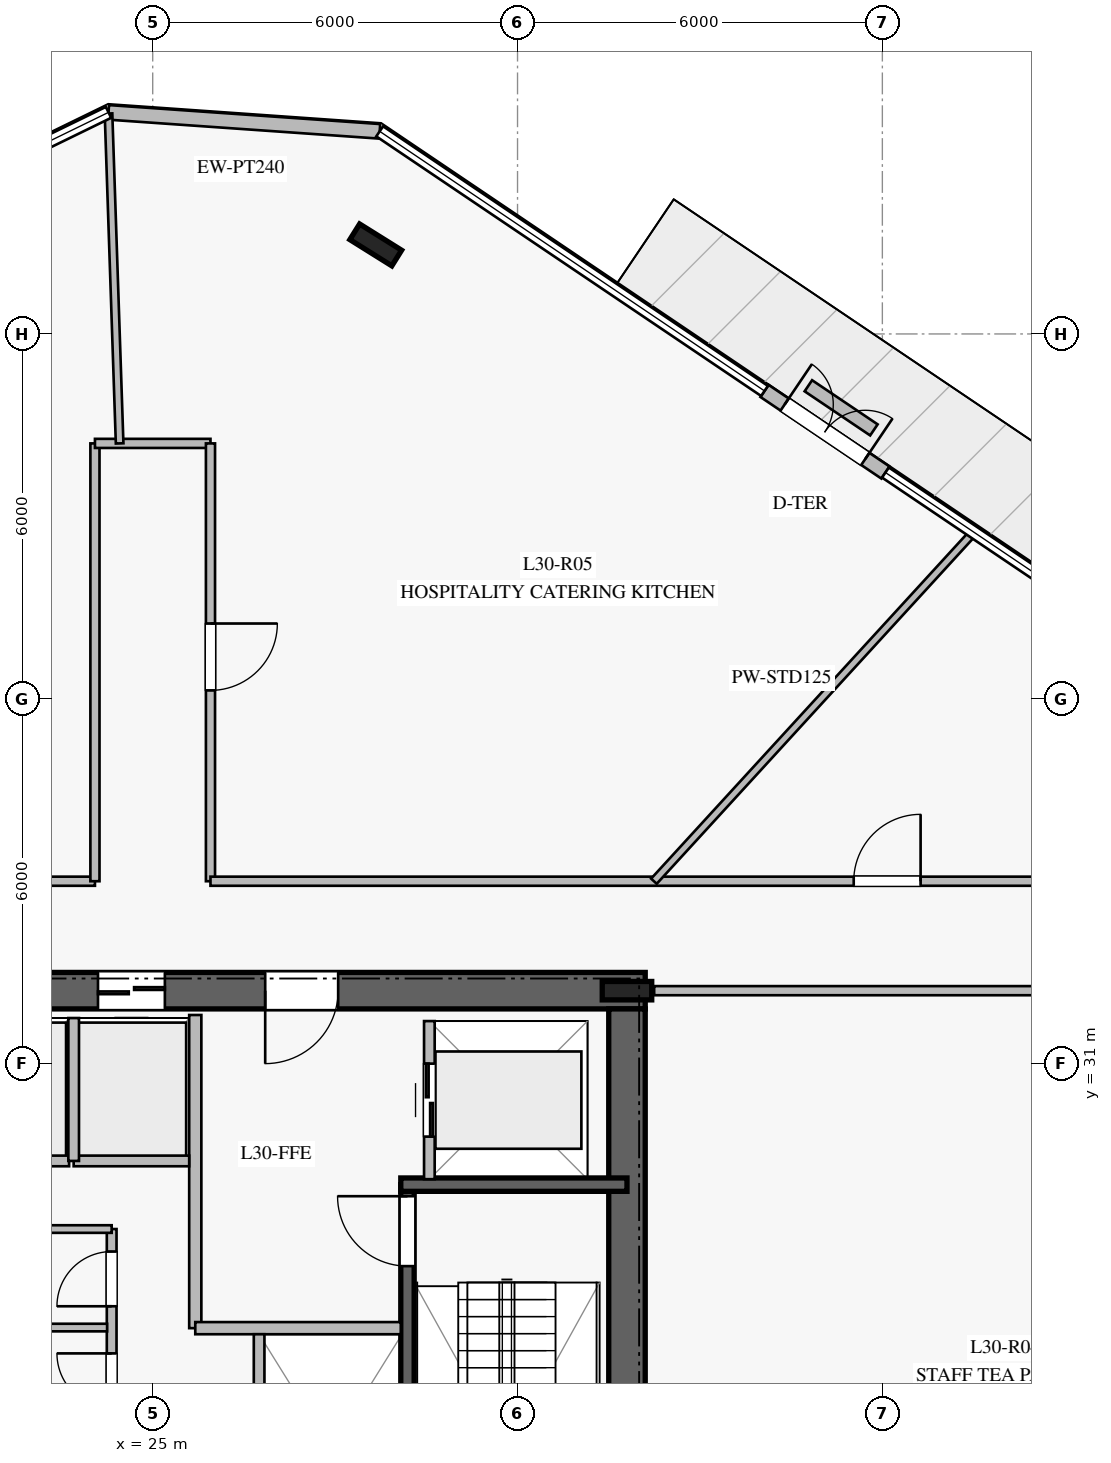
"""IFC4 building model, lengths in metres.
Left out: names, types, materials, properties, quantities, classifications, styles, units other than length and angle.
Written with IfcOpenShell. Run it as: python <this file> out.ifc"""

import sys

from ifc_helpers import new_model, si_unit, direction, frame, frame_2d, origin, origin_2d, place, context, subcontext, project, spatial, rectangle, i_section, extrude, element, fill, save


model = new_model("IFC4")
c1 = context("Model", 3, precision=1e-05, world=origin(), true_north=direction((0.0, 1.0)))
c2 = subcontext(c1, "Body", "Model", "MODEL_VIEW")
j1 = project(units=[si_unit("LENGTHUNIT", "METRE"), si_unit("PLANEANGLEUNIT", "RADIAN")], contexts=[c1])
p1 = place(None, origin())
s1 = spatial("IfcSite", under=j1, at=p1, CompositionType="ELEMENT")
p2 = place(p1, origin())
s2 = spatial("IfcBuilding", under=s1, at=p2, CompositionType="ELEMENT")
p3 = place(p2, frame((0.0, 0.0, 126.4)))
s3 = spatial("IfcBuildingStorey", under=s2, at=p3, CompositionType="ELEMENT", Elevation=126.4)
p4 = place(p3, frame((33.1, 32.2, 0.0), z_axis=(0.0, 0.0, 1.0), x_axis=(-1.0, 0.0, 0.0)))
e1 = element("IfcWall", 1, at=p4, inside=s3, PredefinedType="SHEAR", context=c2, shape_type="SweptSolid", body=[
    extrude(rectangle(XDim=16.2, YDim=0.6, at=frame_2d((8.1, 0.0))), origin(), (0.0, 0.0, 1.0), 3.76),
])
p5 = place(p4, frame((5.05, 0.0, 0.0)))
e2 = element("IfcOpeningElement", 2, at=p5, cuts=e1, PredefinedType="OPENING", context=c2, shape_type="SweptSolid", body=[
    extrude(rectangle(XDim=1.2, YDim=2.25, at=frame_2d((0.6, 1.125))), frame((0.0, 0.31, 0.0), z_axis=(0.0, -1.0, 0.0), x_axis=(1.0, 0.0, 0.0)), (0.0, 0.0, 1.0), 0.62),
])
p6 = place(p4, frame((11.85, 0.0, 0.0)))
e3 = element("IfcOpeningElement", 3, at=p6, cuts=e1, PredefinedType="OPENING", context=c2, shape_type="SweptSolid", body=[
    extrude(rectangle(XDim=1.1, YDim=2.2, at=frame_2d((0.55, 1.1))), frame((0.0, 0.31, 0.0), z_axis=(0.0, -1.0, 0.0), x_axis=(1.0, 0.0, 0.0)), (0.0, 0.0, 1.0), 0.62),
])
p7 = place(p4, frame((9.875, 0.0, 0.0)))
e4 = element("IfcOpeningElement", 4, at=p7, cuts=e1, PredefinedType="OPENING", context=c2, shape_type="SweptSolid", body=[
    extrude(rectangle(XDim=1.1, YDim=2.2, at=frame_2d((0.55, 1.1))), frame((0.0, 0.31, 0.0), z_axis=(0.0, -1.0, 0.0), x_axis=(1.0, 0.0, 0.0)), (0.0, 0.0, 1.0), 0.62),
])
p8 = place(p4, frame((7.9, 0.0, 0.0)))
e5 = element("IfcOpeningElement", 5, at=p8, cuts=e1, PredefinedType="OPENING", context=c2, shape_type="SweptSolid", body=[
    extrude(rectangle(XDim=1.1, YDim=2.2, at=frame_2d((0.55, 1.1))), frame((0.0, 0.31, 0.0), z_axis=(0.0, -1.0, 0.0), x_axis=(1.0, 0.0, 0.0)), (0.0, 0.0, 1.0), 0.62),
])
p9 = place(p3, frame((32.8, 18.1, 0.0), z_axis=(0.0, 0.0, 1.0), x_axis=(0.0, 1.0, 0.0)))
e6 = element("IfcWall", 6, at=p9, inside=s3, PredefinedType="SHEAR", context=c2, shape_type="SweptSolid", body=[
    extrude(rectangle(XDim=13.8, YDim=0.6, at=frame_2d((6.9, 0.0))), origin(), (0.0, 0.0, 1.0), 3.76),
])
p10 = place(p3, frame((32.8, 32.2, 0.0), z_axis=(0.0, 0.0, 1.0), x_axis=(1.0, 0.0, 0.0)))
e7 = element("IfcColumn", 7, at=p10, inside=s3, PredefinedType="COLUMN", context=c2, shape_type="SweptSolid", body=[
    extrude(i_section(OverallWidth=0.303, OverallDepth=0.814, WebThickness=0.021, FlangeThickness=0.04, at=origin_2d()), origin(), (0.0, 0.0, 1.0), 4.0),
])
p11 = place(p3, frame((29.19, 21.79, 0.0), z_axis=(0.0, 0.0, 1.0), x_axis=(0.0, 1.0, 0.0)))
e8 = element("IfcWall", 8, at=p11, inside=s3, PredefinedType="SOLIDWALL", context=c2, shape_type="SweptSolid", body=[
    extrude(rectangle(XDim=7.22, YDim=0.22, at=frame_2d((3.61, 0.0))), origin(), (0.0, 0.0, 1.0), 3.76),
])
p12 = place(p11, frame((5.88, 0.0, 0.0)))
e9 = element("IfcOpeningElement", 9, at=p12, cuts=e8, PredefinedType="OPENING", context=c2, shape_type="SweptSolid", body=[
    extrude(rectangle(XDim=1.15, YDim=2.2, at=frame_2d((0.575, 1.1))), frame((0.0, 0.12, 0.0), z_axis=(0.0, -1.0, 0.0), x_axis=(1.0, 0.0, 0.0)), (0.0, 0.0, 1.0), 0.24),
])
p13 = place(p3, frame((29.08, 29.01, 0.0), z_axis=(0.0, 0.0, 1.0), x_axis=(1.0, 0.0, 0.0)))
e10 = element("IfcWall", 10, at=p13, inside=s3, PredefinedType="SOLIDWALL", context=c2, shape_type="SweptSolid", body=[
    extrude(rectangle(XDim=3.72, YDim=0.22, at=frame_2d((1.86, 0.0))), origin(), (0.0, 0.0, 1.0), 3.76),
])
p14 = place(p3, frame((28.668, 44.464, 0.0), z_axis=(0.0, 0.0, 1.0), x_axis=(-0.848048096156, 0.529919264233, 0.0)))
e11 = element("IfcColumn", 11, at=p14, inside=s3, PredefinedType="COLUMN", context=c2, shape_type="SweptSolid", body=[
    extrude(i_section(OverallWidth=0.303, OverallDepth=0.814, WebThickness=0.021, FlangeThickness=0.04, at=origin_2d()), origin(), (0.0, 0.0, 1.0), 4.0),
])
p15 = place(p3, frame((37.051, 40.721, 0.0), z_axis=(0.0, 0.0, 1.0), x_axis=(-0.828953641959, 0.559317315558, 0.0)))
e12 = element("IfcWall", 12, at=p15, inside=s3, PredefinedType="STANDARD", context=c2, shape_type="SweptSolid", body=[
    extrude(rectangle(XDim=2.399, YDim=0.24, at=frame_2d((1.2, 0.0))), origin(), (0.0, 0.0, 1.0), 3.76),
])
p16 = place(p15, frame((0.4, 0.0, 0.0)))
e13 = element("IfcOpeningElement", 13, at=p16, cuts=e12, PredefinedType="OPENING", context=c2, shape_type="SweptSolid", body=[
    extrude(rectangle(XDim=1.6, YDim=2.25, at=frame_2d((0.8, 1.125))), frame((0.0, 0.13, 0.0), z_axis=(0.0, -1.0, 0.0), x_axis=(1.0, 0.0, 0.0)), (0.0, 0.0, 1.0), 0.26),
])
p17 = place(p3, frame((28.733, 46.332, 0.0), z_axis=(0.0, 0.0, 1.0), x_axis=(-0.997561857217, 0.069787828636, 0.0)))
e14 = element("IfcWall", 14, at=p17, inside=s3, PredefinedType="STANDARD", context=c2, shape_type="SweptSolid", body=[
    extrude(rectangle(XDim=4.471, YDim=0.24, at=frame_2d((2.235, 0.0))), origin(), (0.0, 0.0, 1.0), 3.76),
])
p18 = place(p3, frame((36.861, 41.422, 0.0), z_axis=(0.0, 0.0, 1.0), x_axis=(-0.829527502059, 0.558465865857, 0.0)))
e15 = element("IfcWall", 15, at=p18, inside=s3, PredefinedType="USERDEFINED", context=c2, shape_type="SweptSolid", body=[
    extrude(rectangle(XDim=1.3, YDim=0.22, at=frame_2d((0.65, 0.0))), origin(), (0.0, 0.0, 1.0), 0.4),
])
p19 = place(p3, frame((25.7, 26.65, 0.0), z_axis=(0.0, 0.0, 1.0), x_axis=(0.0, 1.0, 0.0)))
e16 = element("IfcWall", 16, at=p19, inside=s3, PredefinedType="PARTITIONING", context=c2, shape_type="SweptSolid", body=[
    extrude(rectangle(XDim=5.15, YDim=0.2, at=frame_2d((2.575, 0.0))), origin(), (0.0, 0.0, 1.0), 3.76),
])
p20 = place(p3, frame((25.7, 26.65, 0.0), z_axis=(0.0, 0.0, 1.0), x_axis=(1.0, 0.0, 0.0)))
e17 = element("IfcWall", 17, at=p20, inside=s3, PredefinedType="PARTITIONING", context=c2, shape_type="SweptSolid", body=[
    extrude(rectangle(XDim=3.38, YDim=0.2, at=frame_2d((1.69, 0.0))), origin(), (0.0, 0.0, 1.0), 3.76),
])
p21 = place(p3, frame((24.325, 23.35, 0.0), z_axis=(0.0, 0.0, 1.0), x_axis=(0.0, 1.0, 0.0)))
e18 = element("IfcWall", 18, at=p21, inside=s3, PredefinedType="PLUMBINGWALL", context=c2, shape_type="SweptSolid", body=[
    extrude(rectangle(XDim=4.93, YDim=0.16, at=frame_2d((2.465, 0.0))), origin(), (0.0, 0.0, 1.0), 3.76),
])
p22 = place(p21, frame((0.325, 0.0, 0.0)))
e19 = element("IfcOpeningElement", 19, at=p22, cuts=e18, PredefinedType="OPENING", context=c2, shape_type="SweptSolid", body=[
    extrude(rectangle(XDim=0.95, YDim=2.1, at=frame_2d((0.475, 1.05))), frame((0.0, 0.09, 0.0), z_axis=(0.0, -1.0, 0.0), x_axis=(1.0, 0.0, 0.0)), (0.0, 0.0, 1.0), 0.18),
])
p23 = place(p21, frame((1.985, 0.0, 0.0)))
e20 = element("IfcOpeningElement", 20, at=p23, cuts=e18, PredefinedType="OPENING", context=c2, shape_type="SweptSolid", body=[
    extrude(rectangle(XDim=0.9, YDim=2.1, at=frame_2d((0.45, 1.05))), frame((0.0, 0.09, 0.0), z_axis=(0.0, -1.0, 0.0), x_axis=(1.0, 0.0, 0.0)), (0.0, 0.0, 1.0), 0.18),
])
p24 = place(p21, frame((3.66, 0.0, 0.0)))
e21 = element("IfcOpeningElement", 21, at=p24, cuts=e18, PredefinedType="OPENING", context=c2, shape_type="SweptSolid", body=[
    extrude(rectangle(XDim=0.9, YDim=2.1, at=frame_2d((0.45, 1.05))), frame((0.0, 0.09, 0.0), z_axis=(0.0, -1.0, 0.0), x_axis=(1.0, 0.0, 0.0)), (0.0, 0.0, 1.0), 0.18),
])
p25 = place(p3, frame((20.92, 28.28, 0.0), z_axis=(0.0, 0.0, 1.0), x_axis=(1.0, 0.0, 0.0)))
e22 = element("IfcWall", 22, at=p25, inside=s3, PredefinedType="PARTITIONING", context=c2, shape_type="SweptSolid", body=[
    extrude(rectangle(XDim=3.405, YDim=0.125, at=frame_2d((1.703, 0.0))), origin(), (0.0, 0.0, 1.0), 3.76),
])
p26 = place(p25, frame((0.27, 0.0, 0.0)))
e23 = element("IfcOpeningElement", 23, at=p26, cuts=e22, PredefinedType="OPENING", context=c2, shape_type="SweptSolid", body=[
    extrude(rectangle(XDim=1.0, YDim=2.15, at=frame_2d((0.5, 1.075))), frame((0.0, 0.073, 0.0), z_axis=(0.0, -1.0, 0.0), x_axis=(1.0, 0.0, 0.0)), (0.0, 0.0, 1.0), 0.145),
])
p27 = place(p3, frame((22.55, 26.66, 0.0), z_axis=(0.0, 0.0, 1.0), x_axis=(1.0, 0.0, 0.0)))
e24 = element("IfcWall", 24, at=p27, inside=s3, PredefinedType="PARTITIONING", context=c2, shape_type="SweptSolid", body=[
    extrude(rectangle(XDim=1.7, YDim=0.125, at=frame_2d((0.85, 0.0))), origin(), (0.0, 0.0, 1.0), 3.76),
])
p28 = place(p3, frame((21.725, 29.4, 0.0), z_axis=(0.0, 0.0, 1.0), x_axis=(1.0, 0.0, 0.0)))
e25 = element("IfcWall", 25, at=p28, inside=s3, PredefinedType="PARTITIONING", context=c2, shape_type="SweptSolid", body=[
    extrude(rectangle(XDim=1.9, YDim=0.175, at=frame_2d((0.95, 0.0))), origin(), (0.0, 0.0, 1.0), 3.76),
])
p29 = place(p3, frame((23.7, 29.4, 0.0), z_axis=(0.0, 0.0, 1.0), x_axis=(1.0, 0.0, 0.0)))
e26 = element("IfcWall", 26, at=p29, inside=s3, PredefinedType="PARTITIONING", context=c2, shape_type="SweptSolid", body=[
    extrude(rectangle(XDim=1.9, YDim=0.175, at=frame_2d((0.95, 0.0))), origin(), (0.0, 0.0, 1.0), 3.76),
])
p30 = place(p3, frame((23.7, 29.4, 0.0), z_axis=(0.0, 0.0, 1.0), x_axis=(0.0, 1.0, 0.0)))
e27 = element("IfcWall", 27, at=p30, inside=s3, PredefinedType="PARTITIONING", context=c2, shape_type="SweptSolid", body=[
    extrude(rectangle(XDim=2.35, YDim=0.175, at=frame_2d((1.175, 0.0))), origin(), (0.0, 0.0, 1.0), 3.76),
])
p31 = place(p3, frame((26.75, 24.65, 0.0), z_axis=(0.0, 0.0, 1.0), x_axis=(0.0, 1.0, 0.0)))
e28 = element("IfcWall", 28, at=p31, inside=s3, PredefinedType="PARTITIONING", context=c2, shape_type="SweptSolid", body=[
    extrude(rectangle(XDim=1.9, YDim=0.175, at=frame_2d((0.95, 0.0))), origin(), (0.0, 0.0, 1.0), 3.76),
])
p32 = place(p3, frame((29.55, 29.1, 0.0), z_axis=(0.0, 0.0, 1.0), x_axis=(0.0, 1.0, 0.0)))
e29 = element("IfcWall", 29, at=p32, inside=s3, PredefinedType="PARTITIONING", context=c2, shape_type="SweptSolid", body=[
    extrude(rectangle(XDim=2.6, YDim=0.175, at=frame_2d((1.3, 0.0))), origin(), (0.0, 0.0, 1.0), 3.76),
])
p33 = place(p32, frame((0.7, 0.0, 0.0)))
e30 = element("IfcOpeningElement", 30, at=p33, cuts=e29, PredefinedType="OPENING", context=c2, shape_type="SweptSolid", body=[
    extrude(rectangle(XDim=1.2, YDim=2.2, at=frame_2d((0.6, 1.1))), frame((0.0, 0.098, 0.0), z_axis=(0.0, -1.0, 0.0), x_axis=(1.0, 0.0, 0.0)), (0.0, 0.0, 1.0), 0.195),
])
p34 = place(p3, frame((17.2, 34.0, 0.0), z_axis=(0.0, 0.0, 1.0), x_axis=(1.0, 0.0, 0.0)))
e31 = element("IfcWall", 31, at=p34, inside=s3, PredefinedType="PARTITIONING", context=c2, shape_type="SweptSolid", body=[
    extrude(rectangle(XDim=6.85, YDim=0.15, at=frame_2d((3.425, 0.0))), origin(), (0.0, 0.0, 1.0), 3.21),
])
p35 = place(p3, frame((24.05, 34.0, 0.0), z_axis=(0.0, 0.0, 1.0), x_axis=(0.0, 1.0, 0.0)))
e32 = element("IfcWall", 32, at=p35, inside=s3, PredefinedType="PARTITIONING", context=c2, shape_type="SweptSolid", body=[
    extrude(rectangle(XDim=7.2, YDim=0.15, at=frame_2d((3.6, 0.0))), origin(), (0.0, 0.0, 1.0), 3.36),
])
p36 = place(p3, frame((24.05, 41.2, 0.0), z_axis=(0.0, 0.0, 1.0), x_axis=(1.0, 0.0, 0.0)))
e33 = element("IfcWall", 33, at=p36, inside=s3, PredefinedType="PARTITIONING", context=c2, shape_type="SweptSolid", body=[
    extrude(rectangle(XDim=1.9, YDim=0.15, at=frame_2d((0.95, 0.0))), origin(), (0.0, 0.0, 1.0), 3.76),
])
p37 = place(p3, frame((25.95, 41.2, 0.0), z_axis=(0.0, 0.0, 1.0), x_axis=(0.0, -1.0, 0.0)))
e34 = element("IfcWall", 34, at=p37, inside=s3, PredefinedType="PARTITIONING", context=c2, shape_type="SweptSolid", body=[
    extrude(rectangle(XDim=7.2, YDim=0.15, at=frame_2d((3.6, 0.0))), origin(), (0.0, 0.0, 1.0), 3.36),
])
p38 = place(p37, frame((2.962, 0.0, 0.0)))
e35 = element("IfcOpeningElement", 35, at=p38, cuts=e34, PredefinedType="OPENING", context=c2, shape_type="SweptSolid", body=[
    extrude(rectangle(XDim=1.1, YDim=2.2, at=frame_2d((0.55, 1.1))), frame((0.0, 0.085, 0.0), z_axis=(0.0, -1.0, 0.0), x_axis=(1.0, 0.0, 0.0)), (0.0, 0.0, 1.0), 0.17),
])
p39 = place(p3, frame((25.95, 34.0, 0.0), z_axis=(0.0, 0.0, 1.0), x_axis=(1.0, 0.0, 0.0)))
e36 = element("IfcWall", 36, at=p39, inside=s3, PredefinedType="PARTITIONING", context=c2, shape_type="SweptSolid", body=[
    extrude(rectangle(XDim=15.25, YDim=0.15, at=frame_2d((7.625, 0.0))), origin(), (0.0, 0.0, 1.0), 3.21),
])
p40 = place(p39, frame((10.579, 0.0, 0.0)))
e37 = element("IfcOpeningElement", 37, at=p40, cuts=e36, PredefinedType="OPENING", context=c2, shape_type="SweptSolid", body=[
    extrude(rectangle(XDim=1.1, YDim=2.2, at=frame_2d((0.55, 1.1))), frame((0.0, 0.085, 0.0), z_axis=(0.0, -1.0, 0.0), x_axis=(1.0, 0.0, 0.0)), (0.0, 0.0, 1.0), 0.17),
])
p41 = place(p3, frame((41.2, 32.2, 0.0), z_axis=(0.0, 0.0, 1.0), x_axis=(-1.0, 0.0, 0.0)))
e38 = element("IfcWall", 38, at=p41, inside=s3, PredefinedType="PARTITIONING", context=c2, shape_type="SweptSolid", body=[
    extrude(rectangle(XDim=7.953, YDim=0.15, at=frame_2d((3.977, 0.0))), origin(), (0.0, 0.0, 1.0), 3.21),
])
p42 = place(p3, frame((33.243, 34.0, 0.0), z_axis=(0.0, 0.0, 1.0), x_axis=(0.675476997876, 0.737381058436, 0.0)))
e39 = element("IfcWall", 39, at=p42, inside=s3, PredefinedType="PARTITIONING", context=c2, shape_type="SweptSolid", body=[
    extrude(rectangle(XDim=7.769, YDim=0.125, at=frame_2d((3.885, 0.0))), origin(), (0.0, 0.0, 1.0), 3.05),
])
p43 = place(p3, frame((24.456, 41.2, 0.0), z_axis=(0.0, 0.0, 1.0), x_axis=(-0.03373264791, 0.999430892291, 0.0)))
e40 = element("IfcWall", 40, at=p43, inside=s3, PredefinedType="PARTITIONING", context=c2, shape_type="SweptSolid", body=[
    extrude(rectangle(XDim=5.428, YDim=0.125, at=frame_2d((2.714, 0.0))), origin(), (0.0, 0.0, 1.0), 3.16),
])
p44 = place(p16, frame((1.6, 0.0, 0.0), z_axis=(0.0, 0.0, 1.0), x_axis=(-1.0, 0.0, 0.0)))
e41 = element("IfcDoor", 41, at=p44, inside=s3, OperationType="DOUBLE_DOOR_SINGLE_SWING", PredefinedType="DOOR", context=c2, shape_type="SweptSolid", body=[
    extrude(rectangle(XDim=1.6, YDim=2.25, at=frame_2d((0.8, 1.125))), frame((0.0, 0.025, 0.0), z_axis=(0.0, -1.0, 0.0), x_axis=(1.0, 0.0, 0.0)), (0.0, 0.0, 1.0), 0.05),
])
fill(e13, e41)
p45 = place(p12, origin())
e42 = element("IfcDoor", 42, at=p45, inside=s3, OperationType="SINGLE_SWING_RIGHT", PredefinedType="DOOR", context=c2, shape_type="SweptSolid", body=[
    extrude(rectangle(XDim=1.15, YDim=2.2, at=frame_2d((0.575, 1.1))), frame((0.0, 0.025, 0.0), z_axis=(0.0, -1.0, 0.0), x_axis=(1.0, 0.0, 0.0)), (0.0, 0.0, 1.0), 0.05),
])
fill(e9, e42)
p46 = place(p5, origin())
e43 = element("IfcDoor", 43, at=p46, inside=s3, OperationType="SINGLE_SWING_RIGHT", PredefinedType="DOOR", context=c2, shape_type="SweptSolid", body=[
    extrude(rectangle(XDim=1.2, YDim=2.25, at=frame_2d((0.6, 1.125))), frame((0.0, 0.025, 0.0), z_axis=(0.0, -1.0, 0.0), x_axis=(1.0, 0.0, 0.0)), (0.0, 0.0, 1.0), 0.05),
])
fill(e2, e43)
p47 = place(p23, origin())
e44 = element("IfcDoor", 44, at=p47, inside=s3, OperationType="SINGLE_SWING_RIGHT", PredefinedType="DOOR", context=c2, shape_type="SweptSolid", body=[
    extrude(rectangle(XDim=0.9, YDim=2.1, at=frame_2d((0.45, 1.05))), frame((0.0, 0.025, 0.0), z_axis=(0.0, -1.0, 0.0), x_axis=(1.0, 0.0, 0.0)), (0.0, 0.0, 1.0), 0.05),
])
fill(e20, e44)
p48 = place(p24, origin())
e45 = element("IfcDoor", 45, at=p48, inside=s3, OperationType="SINGLE_SWING_LEFT", PredefinedType="DOOR", context=c2, shape_type="SweptSolid", body=[
    extrude(rectangle(XDim=0.9, YDim=2.1, at=frame_2d((0.45, 1.05))), frame((0.0, 0.025, 0.0), z_axis=(0.0, -1.0, 0.0), x_axis=(1.0, 0.0, 0.0)), (0.0, 0.0, 1.0), 0.05),
])
fill(e21, e45)
p49 = place(p8, origin())
e46 = element("IfcDoor", 46, at=p49, inside=s3, OperationType="DOUBLE_DOOR_SLIDING", PredefinedType="DOOR", context=c2, shape_type="SweptSolid", body=[
    extrude(rectangle(XDim=1.1, YDim=2.2, at=frame_2d((0.55, 1.1))), frame((0.0, 0.025, 0.0), z_axis=(0.0, -1.0, 0.0), x_axis=(1.0, 0.0, 0.0)), (0.0, 0.0, 1.0), 0.05),
])
fill(e5, e46)
p50 = place(p33, origin())
e47 = element("IfcDoor", 47, at=p50, inside=s3, OperationType="DOUBLE_DOOR_SLIDING", PredefinedType="DOOR", context=c2, shape_type="SweptSolid", body=[
    extrude(rectangle(XDim=1.2, YDim=2.2, at=frame_2d((0.6, 1.1))), frame((0.0, 0.025, 0.0), z_axis=(0.0, -1.0, 0.0), x_axis=(1.0, 0.0, 0.0)), (0.0, 0.0, 1.0), 0.05),
])
fill(e30, e47)
p51 = place(p40, origin())
e48 = element("IfcDoor", 48, at=p51, inside=s3, OperationType="SINGLE_SWING_RIGHT", PredefinedType="DOOR", context=c2, shape_type="SweptSolid", body=[
    extrude(rectangle(XDim=1.1, YDim=2.2, at=frame_2d((0.55, 1.1))), frame((0.0, 0.025, 0.0), z_axis=(0.0, -1.0, 0.0), x_axis=(1.0, 0.0, 0.0)), (0.0, 0.0, 1.0), 0.05),
])
fill(e37, e48)
p52 = place(p38, origin())
e49 = element("IfcDoor", 49, at=p52, inside=s3, OperationType="SINGLE_SWING_LEFT", PredefinedType="DOOR", context=c2, shape_type="SweptSolid", body=[
    extrude(rectangle(XDim=1.1, YDim=2.2, at=frame_2d((0.55, 1.1))), frame((0.0, 0.025, 0.0), z_axis=(0.0, -1.0, 0.0), x_axis=(1.0, 0.0, 0.0)), (0.0, 0.0, 1.0), 0.05),
])
fill(e35, e49)
save(model, sys.argv[1])
